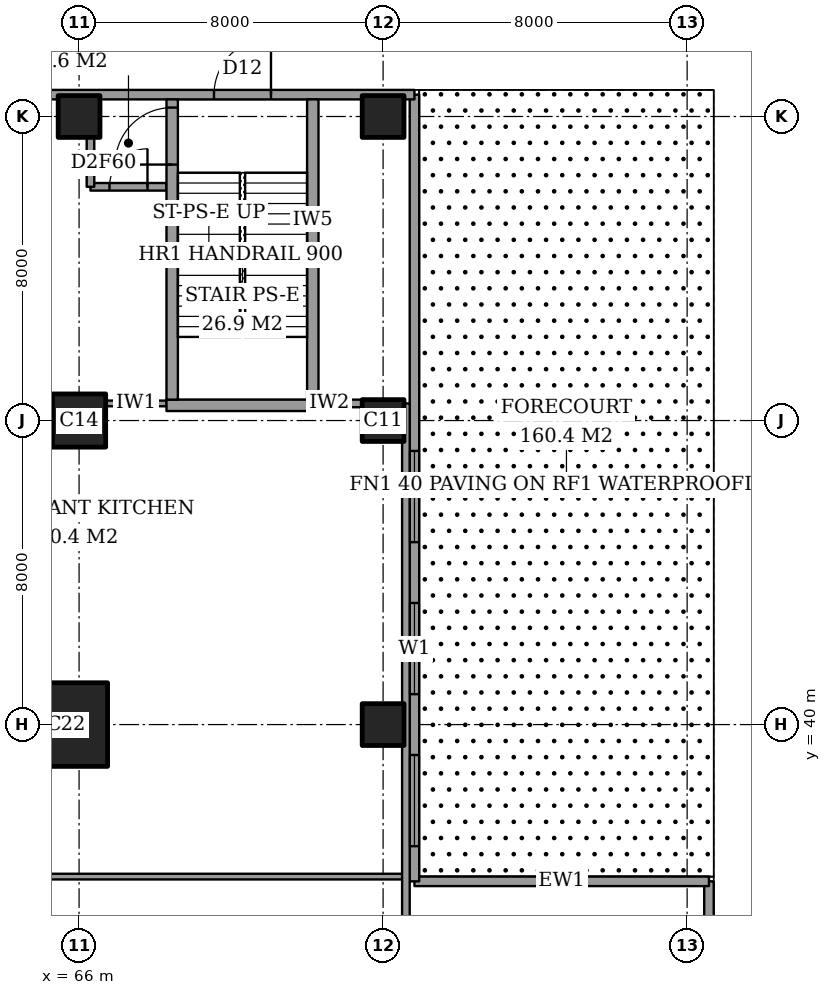
"""IFC4 building model, lengths in metres.
Left out: names, types, materials, properties, quantities, classifications, styles, units other than length and angle.
Written with IfcOpenShell. Run it as: python <this file> out.ifc"""

import sys

from ifc_helpers import new_model, si_unit, direction, frame, frame_2d, origin, origin_2d, place, context, subcontext, project, spatial, rectangle, extrude, element, fill, save


model = new_model("IFC4")
c1 = context("Model", 3, precision=1e-05, world=origin(), true_north=direction((0.0, 1.0)))
c2 = subcontext(c1, "Body", "Model", "MODEL_VIEW")
j1 = project(units=[si_unit("LENGTHUNIT", "METRE"), si_unit("PLANEANGLEUNIT", "RADIAN")], contexts=[c1])
p1 = place(None, origin())
s1 = spatial("IfcSite", under=j1, at=p1, CompositionType="ELEMENT")
p2 = place(p1, origin())
s2 = spatial("IfcBuilding", under=s1, at=p2, CompositionType="ELEMENT")
p3 = place(p2, origin())
s3 = spatial("IfcBuildingStorey", under=s2, at=p3, CompositionType="ELEMENT", Elevation=0.0)
p4 = place(p3, frame((65.65, 40.0, 0.0), z_axis=(0.0, 0.0, 1.0), x_axis=(1.0, 0.0, 0.0)))
e1 = element("IfcColumn", 1, at=p4, inside=s3, PredefinedType="COLUMN", context=c2, shape_type="SweptSolid", body=[
    extrude(rectangle(XDim=2.2, YDim=2.2, at=origin_2d()), origin(), (0.0, 0.0, 1.0), 6.0),
])
p5 = place(p3, frame((66.0, 48.0, 0.0), z_axis=(0.0, 0.0, 1.0), x_axis=(1.0, 0.0, 0.0)))
e2 = element("IfcColumn", 2, at=p5, inside=s3, PredefinedType="COLUMN", context=c2, shape_type="SweptSolid", body=[
    extrude(rectangle(XDim=1.4, YDim=1.4, at=origin_2d()), origin(), (0.0, 0.0, 1.0), 6.0),
])
for number, where, z_axis, x_axis in (
    (3, (66.0, 56.0, 0.0), (0.0, 0.0, 1.0), (1.0, 0.0, 0.0)),
    (4, (74.0, 40.0, 0.0), (0.0, 0.0, 1.0), (1.0, 0.0, 0.0)),
    (5, (74.0, 48.0, 0.0), (0.0, 0.0, 1.0), (1.0, 0.0, 0.0)),
    (6, (74.0, 56.0, 0.0), (0.0, 0.0, 1.0), (1.0, 0.0, 0.0)),
):
    element("IfcColumn", number, at=place(p3, frame(where, z_axis=z_axis, x_axis=x_axis)), inside=s3, PredefinedType="COLUMN", context=c2, shape_type="SweptSolid", body=[
        extrude(rectangle(XDim=1.1, YDim=1.1, at=origin_2d()), origin(), (0.0, 0.0, 1.0), 6.0),
    ])
p6 = place(p3, frame((82.575, -16.575, 0.0), z_axis=(0.0, 0.0, 1.0), x_axis=(0.0, 1.0, 0.0)))
e7 = element("IfcWall", 7, at=p6, inside=s3, PredefinedType="SOLIDWALL", context=c2, shape_type="SweptSolid", body=[
    extrude(rectangle(XDim=52.45, YDim=0.25, at=frame_2d((26.225, 0.0))), origin(), (0.0, 0.0, 1.0), 6.0),
])
p7 = place(p6, frame((1.65, 0.0, 0.3)))
e8 = element("IfcOpeningElement", 8, at=p7, cuts=e7, PredefinedType="OPENING", context=c2, shape_type="SweptSolid", body=[
    extrude(rectangle(XDim=2.4, YDim=3.6, at=frame_2d((1.2, 1.8))), frame((0.0, 0.135, 0.0), z_axis=(0.0, -1.0, 0.0), x_axis=(1.0, 0.0, 0.0)), (0.0, 0.0, 1.0), 0.27),
])
p8 = place(p6, frame((5.1, 0.0, 0.3)))
e9 = element("IfcOpeningElement", 9, at=p8, cuts=e7, PredefinedType="OPENING", context=c2, shape_type="SweptSolid", body=[
    extrude(rectangle(XDim=2.4, YDim=3.6, at=frame_2d((1.2, 1.8))), frame((0.0, 0.135, 0.0), z_axis=(0.0, -1.0, 0.0), x_axis=(1.0, 0.0, 0.0)), (0.0, 0.0, 1.0), 0.27),
])
p9 = place(p6, frame((9.65, 0.0, 0.3)))
e10 = element("IfcOpeningElement", 10, at=p9, cuts=e7, PredefinedType="OPENING", context=c2, shape_type="SweptSolid", body=[
    extrude(rectangle(XDim=2.4, YDim=3.6, at=frame_2d((1.2, 1.8))), frame((0.0, 0.135, 0.0), z_axis=(0.0, -1.0, 0.0), x_axis=(1.0, 0.0, 0.0)), (0.0, 0.0, 1.0), 0.27),
])
p10 = place(p3, frame((82.575, 35.875, 0.0), z_axis=(0.0, 0.0, 1.0), x_axis=(-1.0, 0.0, 0.0)))
e11 = element("IfcWall", 11, at=p10, inside=s3, PredefinedType="SOLIDWALL", context=c2, shape_type="SweptSolid", body=[
    extrude(rectangle(XDim=7.75, YDim=0.25, at=frame_2d((3.875, 0.0))), origin(), (0.0, 0.0, 1.0), 6.0),
])
p11 = place(p3, frame((74.825, 35.875, 0.0), z_axis=(0.0, 0.0, 1.0), x_axis=(0.0, 1.0, 0.0)))
e12 = element("IfcWall", 12, at=p11, inside=s3, PredefinedType="SOLIDWALL", context=c2, shape_type="SweptSolid", body=[
    extrude(rectangle(XDim=20.7, YDim=0.25, at=frame_2d((10.35, 0.0))), origin(), (0.0, 0.0, 1.0), 6.0),
])
p12 = place(p11, frame((4.925, 0.0, 0.3)))
e13 = element("IfcOpeningElement", 13, at=p12, cuts=e12, PredefinedType="OPENING", context=c2, shape_type="SweptSolid", body=[
    extrude(rectangle(XDim=2.4, YDim=3.6, at=frame_2d((1.2, 1.8))), frame((0.0, 0.135, 0.0), z_axis=(0.0, -1.0, 0.0), x_axis=(1.0, 0.0, 0.0)), (0.0, 0.0, 1.0), 0.27),
])
p13 = place(p11, frame((8.925, 0.0, 0.3)))
e14 = element("IfcOpeningElement", 14, at=p13, cuts=e12, PredefinedType="OPENING", context=c2, shape_type="SweptSolid", body=[
    extrude(rectangle(XDim=2.4, YDim=3.6, at=frame_2d((1.2, 1.8))), frame((0.0, 0.135, 0.0), z_axis=(0.0, -1.0, 0.0), x_axis=(1.0, 0.0, 0.0)), (0.0, 0.0, 1.0), 0.27),
])
p14 = place(p11, frame((0.925, 0.0, 0.3)))
e15 = element("IfcOpeningElement", 15, at=p14, cuts=e12, PredefinedType="OPENING", context=c2, shape_type="SweptSolid", body=[
    extrude(rectangle(XDim=2.4, YDim=3.6, at=frame_2d((1.2, 1.8))), frame((0.0, 0.135, 0.0), z_axis=(0.0, -1.0, 0.0), x_axis=(1.0, 0.0, 0.0)), (0.0, 0.0, 1.0), 0.27),
])
p15 = place(p3, frame((74.825, 56.575, 0.0), z_axis=(0.0, 0.0, 1.0), x_axis=(-1.0, 0.0, 0.0)))
e16 = element("IfcWall", 16, at=p15, inside=s3, PredefinedType="SOLIDWALL", context=c2, shape_type="SweptSolid", body=[
    extrude(rectangle(XDim=91.4, YDim=0.25, at=frame_2d((45.7, 0.0))), origin(), (0.0, 0.0, 1.0), 6.0),
])
p16 = place(p15, frame((27.025, 0.0, 0.0)))
e17 = element("IfcOpeningElement", 17, at=p16, cuts=e16, PredefinedType="OPENING", context=c2, shape_type="SweptSolid", body=[
    extrude(rectangle(XDim=3.6, YDim=3.6, at=frame_2d((1.8, 1.8))), frame((0.0, 0.135, 0.0), z_axis=(0.0, -1.0, 0.0), x_axis=(1.0, 0.0, 0.0)), (0.0, 0.0, 1.0), 0.27),
])
p17 = place(p15, frame((9.863, 0.0, 0.3)))
e18 = element("IfcOpeningElement", 18, at=p17, cuts=e16, PredefinedType="OPENING", context=c2, shape_type="SweptSolid", body=[
    extrude(rectangle(XDim=2.4, YDim=3.6, at=frame_2d((1.2, 1.8))), frame((0.0, 0.135, 0.0), z_axis=(0.0, -1.0, 0.0), x_axis=(1.0, 0.0, 0.0)), (0.0, 0.0, 1.0), 0.27),
])
p18 = place(p15, frame((13.238, 0.0, 0.3)))
e19 = element("IfcOpeningElement", 19, at=p18, cuts=e16, PredefinedType="OPENING", context=c2, shape_type="SweptSolid", body=[
    extrude(rectangle(XDim=2.4, YDim=3.6, at=frame_2d((1.2, 1.8))), frame((0.0, 0.135, 0.0), z_axis=(0.0, -1.0, 0.0), x_axis=(1.0, 0.0, 0.0)), (0.0, 0.0, 1.0), 0.27),
])
p19 = place(p15, frame((17.975, 0.0, 0.3)))
e20 = element("IfcOpeningElement", 20, at=p19, cuts=e16, PredefinedType="OPENING", context=c2, shape_type="SweptSolid", body=[
    extrude(rectangle(XDim=2.4, YDim=3.6, at=frame_2d((1.2, 1.8))), frame((0.0, 0.135, 0.0), z_axis=(0.0, -1.0, 0.0), x_axis=(1.0, 0.0, 0.0)), (0.0, 0.0, 1.0), 0.27),
])
p20 = place(p15, frame((21.275, 0.0, 0.3)))
e21 = element("IfcOpeningElement", 21, at=p20, cuts=e16, PredefinedType="OPENING", context=c2, shape_type="SweptSolid", body=[
    extrude(rectangle(XDim=2.4, YDim=3.6, at=frame_2d((1.2, 1.8))), frame((0.0, 0.135, 0.0), z_axis=(0.0, -1.0, 0.0), x_axis=(1.0, 0.0, 0.0)), (0.0, 0.0, 1.0), 0.27),
])
p21 = place(p15, frame((34.15, 0.0, 0.3)))
e22 = element("IfcOpeningElement", 22, at=p21, cuts=e16, PredefinedType="OPENING", context=c2, shape_type="SweptSolid", body=[
    extrude(rectangle(XDim=2.4, YDim=3.6, at=frame_2d((1.2, 1.8))), frame((0.0, 0.135, 0.0), z_axis=(0.0, -1.0, 0.0), x_axis=(1.0, 0.0, 0.0)), (0.0, 0.0, 1.0), 0.27),
])
p22 = place(p15, frame((38.1, 0.0, 0.3)))
e23 = element("IfcOpeningElement", 23, at=p22, cuts=e16, PredefinedType="OPENING", context=c2, shape_type="SweptSolid", body=[
    extrude(rectangle(XDim=2.4, YDim=3.6, at=frame_2d((1.2, 1.8))), frame((0.0, 0.135, 0.0), z_axis=(0.0, -1.0, 0.0), x_axis=(1.0, 0.0, 0.0)), (0.0, 0.0, 1.0), 0.27),
])
p23 = place(p15, frame((43.15, 0.0, 0.3)))
e24 = element("IfcOpeningElement", 24, at=p23, cuts=e16, PredefinedType="OPENING", context=c2, shape_type="SweptSolid", body=[
    extrude(rectangle(XDim=2.4, YDim=3.6, at=frame_2d((1.2, 1.8))), frame((0.0, 0.135, 0.0), z_axis=(0.0, -1.0, 0.0), x_axis=(1.0, 0.0, 0.0)), (0.0, 0.0, 1.0), 0.27),
])
p24 = place(p15, frame((47.1, 0.0, 0.3)))
e25 = element("IfcOpeningElement", 25, at=p24, cuts=e16, PredefinedType="OPENING", context=c2, shape_type="SweptSolid", body=[
    extrude(rectangle(XDim=2.4, YDim=3.6, at=frame_2d((1.2, 1.8))), frame((0.0, 0.135, 0.0), z_axis=(0.0, -1.0, 0.0), x_axis=(1.0, 0.0, 0.0)), (0.0, 0.0, 1.0), 0.27),
])
p25 = place(p15, frame((53.775, 0.0, 0.0)))
e26 = element("IfcOpeningElement", 26, at=p25, cuts=e16, PredefinedType="OPENING", context=c2, shape_type="SweptSolid", body=[
    extrude(rectangle(XDim=2.1, YDim=2.4, at=frame_2d((1.05, 1.2))), frame((0.0, 0.135, 0.0), z_axis=(0.0, -1.0, 0.0), x_axis=(1.0, 0.0, 0.0)), (0.0, 0.0, 1.0), 0.27),
])
p26 = place(p15, frame((61.775, 0.0, 0.0)))
e27 = element("IfcOpeningElement", 27, at=p26, cuts=e16, PredefinedType="OPENING", context=c2, shape_type="SweptSolid", body=[
    extrude(rectangle(XDim=2.1, YDim=2.4, at=frame_2d((1.05, 1.2))), frame((0.0, 0.135, 0.0), z_axis=(0.0, -1.0, 0.0), x_axis=(1.0, 0.0, 0.0)), (0.0, 0.0, 1.0), 0.27),
])
p27 = place(p15, frame((69.775, 0.0, 0.0)))
e28 = element("IfcOpeningElement", 28, at=p27, cuts=e16, PredefinedType="OPENING", context=c2, shape_type="SweptSolid", body=[
    extrude(rectangle(XDim=2.1, YDim=2.4, at=frame_2d((1.05, 1.2))), frame((0.0, 0.135, 0.0), z_axis=(0.0, -1.0, 0.0), x_axis=(1.0, 0.0, 0.0)), (0.0, 0.0, 1.0), 0.27),
])
p28 = place(p15, frame((83.9, 0.0, 0.3)))
e29 = element("IfcOpeningElement", 29, at=p28, cuts=e16, PredefinedType="OPENING", context=c2, shape_type="SweptSolid", body=[
    extrude(rectangle(XDim=2.4, YDim=3.6, at=frame_2d((1.2, 1.8))), frame((0.0, 0.135, 0.0), z_axis=(0.0, -1.0, 0.0), x_axis=(1.0, 0.0, 0.0)), (0.0, 0.0, 1.0), 0.27),
])
p29 = place(p15, frame((87.35, 0.0, 0.3)))
e30 = element("IfcOpeningElement", 30, at=p29, cuts=e16, PredefinedType="OPENING", context=c2, shape_type="SweptSolid", body=[
    extrude(rectangle(XDim=2.4, YDim=3.6, at=frame_2d((1.2, 1.8))), frame((0.0, 0.135, 0.0), z_axis=(0.0, -1.0, 0.0), x_axis=(1.0, 0.0, 0.0)), (0.0, 0.0, 1.0), 0.27),
])
p30 = place(p15, frame((5.275, 0.0, 0.0), z_axis=(0.0, 0.0, 1.0), x_axis=(-1.0, 0.0, 0.0)))
e31 = element("IfcOpeningElement", 31, at=p30, cuts=e16, PredefinedType="OPENING", context=c2, shape_type="SweptSolid", body=[
    extrude(rectangle(XDim=1.5, YDim=2.1, at=frame_2d((0.75, 1.05))), frame((0.0, 0.135, 0.0), z_axis=(0.0, -1.0, 0.0), x_axis=(1.0, 0.0, 0.0)), (0.0, 0.0, 1.0), 0.27),
])
p31 = place(p15, frame((79.875, 0.0, 0.0), z_axis=(0.0, 0.0, 1.0), x_axis=(-1.0, 0.0, 0.0)))
e32 = element("IfcOpeningElement", 32, at=p31, cuts=e16, PredefinedType="OPENING", context=c2, shape_type="SweptSolid", body=[
    extrude(rectangle(XDim=1.5, YDim=2.1, at=frame_2d((0.75, 1.05))), frame((0.0, 0.135, 0.0), z_axis=(0.0, -1.0, 0.0), x_axis=(1.0, 0.0, 0.0)), (0.0, 0.0, 1.0), 0.27),
])
p32 = place(p3, frame((47.1, 36.0, 0.0), z_axis=(0.0, 0.0, 1.0), x_axis=(1.0, 0.0, 0.0)))
e33 = element("IfcWall", 33, at=p32, inside=s3, PredefinedType="PARTITIONING", context=c2, shape_type="SweptSolid", body=[
    extrude(rectangle(XDim=27.5, YDim=0.15, at=frame_2d((13.75, 0.0))), origin(), (0.0, 0.0, 1.0), 5.7),
])
p33 = place(p32, frame((13.75, 0.0, 0.0)))
e34 = element("IfcOpeningElement", 34, at=p33, cuts=e33, PredefinedType="OPENING", context=c2, shape_type="SweptSolid", body=[
    extrude(rectangle(XDim=0.9, YDim=2.1, at=frame_2d((0.45, 1.05))), frame((0.0, 0.085, 0.0), z_axis=(0.0, -1.0, 0.0), x_axis=(1.0, 0.0, 0.0)), (0.0, 0.0, 1.0), 0.17),
])
p34 = place(p3, frame((72.3, 48.45, 0.0), z_axis=(0.0, 0.0, 1.0), x_axis=(1.0, 0.0, 0.0)))
e35 = element("IfcWall", 35, at=p34, inside=s3, PredefinedType="PARTITIONING", context=c2, shape_type="SweptSolid", body=[
    extrude(rectangle(XDim=1.15, YDim=0.2, at=frame_2d((0.575, 0.0))), origin(), (0.0, 0.0, 1.0), 5.7),
])
p35 = place(p3, frame((59.1, 48.45, 0.0), z_axis=(0.0, 0.0, 1.0), x_axis=(1.0, 0.0, 0.0)))
e36 = element("IfcWall", 36, at=p35, inside=s3, PredefinedType="PARTITIONING", context=c2, shape_type="SweptSolid", body=[
    extrude(rectangle(XDim=6.2, YDim=0.15, at=frame_2d((3.1, 0.0))), origin(), (0.0, 0.0, 1.0), 5.7),
])
p36 = place(p3, frame((66.7, 48.45, 0.0), z_axis=(0.0, 0.0, 1.0), x_axis=(1.0, 0.0, 0.0)))
e37 = element("IfcWall", 37, at=p36, inside=s3, PredefinedType="PARTITIONING", context=c2, shape_type="SweptSolid", body=[
    extrude(rectangle(XDim=1.6, YDim=0.15, at=frame_2d((0.8, 0.0))), origin(), (0.0, 0.0, 1.0), 5.7),
])
p37 = place(p3, frame((66.3, 54.15, 0.0), z_axis=(0.0, 0.0, 1.0), x_axis=(1.0, 0.0, 0.0)))
e38 = element("IfcWall", 38, at=p37, inside=s3, PredefinedType="PARTITIONING", context=c2, shape_type="SweptSolid", body=[
    extrude(rectangle(XDim=2.0, YDim=0.2, at=frame_2d((1.0, 0.0))), origin(), (0.0, 0.0, 1.0), 5.7),
])
p38 = place(p37, frame((0.5, 0.0, 0.0)))
e39 = element("IfcOpeningElement", 39, at=p38, cuts=e38, PredefinedType="OPENING", context=c2, shape_type="SweptSolid", body=[
    extrude(rectangle(XDim=1.0, YDim=2.1, at=frame_2d((0.5, 1.05))), frame((0.0, 0.11, 0.0), z_axis=(0.0, -1.0, 0.0), x_axis=(1.0, 0.0, 0.0)), (0.0, 0.0, 1.0), 0.22),
])
p39 = place(p3, frame((66.3, 54.15, 0.0), z_axis=(0.0, 0.0, 1.0), x_axis=(0.0, 1.0, 0.0)))
e40 = element("IfcWall", 40, at=p39, inside=s3, PredefinedType="PARTITIONING", context=c2, shape_type="SweptSolid", body=[
    extrude(rectangle(XDim=1.3, YDim=0.2, at=frame_2d((0.65, 0.0))), origin(), (0.0, 0.0, 1.0), 4.3),
])
p40 = place(p3, frame((74.6, 0.0, 0.0), z_axis=(0.0, 0.0, 1.0), x_axis=(0.0, 1.0, 0.0)))
e41 = element("IfcWall", 41, at=p40, inside=s3, PredefinedType="PARTITIONING", context=c2, shape_type="SweptSolid", body=[
    extrude(rectangle(XDim=48.45, YDim=0.2, at=frame_2d((24.225, 0.0))), origin(), (0.0, 0.0, 1.0), 5.7),
])
p41 = place(p3, frame((68.3, 48.4, 0.0), z_axis=(0.0, 0.0, 1.0), x_axis=(1.0, 0.0, 0.0)))
e42 = element("IfcWall", 42, at=p41, inside=s3, PredefinedType="PARTITIONING", context=c2, shape_type="SweptSolid", body=[
    extrude(rectangle(XDim=4.0, YDim=0.3, at=frame_2d((2.0, 0.0))), origin(), (0.0, 0.0, 1.0), 6.0),
])
p42 = place(p3, frame((68.45, 48.55, 0.0), z_axis=(0.0, 0.0, 1.0), x_axis=(0.0, 1.0, 0.0)))
e43 = element("IfcWall", 43, at=p42, inside=s3, PredefinedType="PARTITIONING", context=c2, shape_type="SweptSolid", body=[
    extrude(rectangle(XDim=7.9, YDim=0.3, at=frame_2d((3.95, 0.0))), origin(), (0.0, 0.0, 1.0), 6.0),
])
p43 = place(p42, frame((6.185, 0.0, 0.0)))
e44 = element("IfcOpeningElement", 44, at=p43, cuts=e43, PredefinedType="OPENING", context=c2, shape_type="SweptSolid", body=[
    extrude(rectangle(XDim=1.5, YDim=2.1, at=frame_2d((0.75, 1.05))), frame((0.0, 0.16, 0.0), z_axis=(0.0, -1.0, 0.0), x_axis=(1.0, 0.0, 0.0)), (0.0, 0.0, 1.0), 0.32),
])
p44 = place(p3, frame((72.15, 48.55, 0.0), z_axis=(0.0, 0.0, 1.0), x_axis=(0.0, 1.0, 0.0)))
e45 = element("IfcWall", 45, at=p44, inside=s3, PredefinedType="PARTITIONING", context=c2, shape_type="SweptSolid", body=[
    extrude(rectangle(XDim=7.9, YDim=0.3, at=frame_2d((3.95, 0.0))), origin(), (0.0, 0.0, 1.0), 6.0),
])
p45 = place(p12, origin())
e46 = element("IfcWindow", 46, at=p45, inside=s3, PartitioningType="SINGLE_PANEL", PredefinedType="WINDOW", context=c2, shape_type="SweptSolid", body=[
    extrude(rectangle(XDim=2.4, YDim=3.6, at=frame_2d((1.2, 1.8))), frame((0.0, 0.03, 0.0), z_axis=(0.0, -1.0, 0.0), x_axis=(1.0, 0.0, 0.0)), (0.0, 0.0, 1.0), 0.06),
])
fill(e13, e46)
p46 = place(p13, origin())
e47 = element("IfcWindow", 47, at=p46, inside=s3, PartitioningType="SINGLE_PANEL", PredefinedType="WINDOW", context=c2, shape_type="SweptSolid", body=[
    extrude(rectangle(XDim=2.4, YDim=3.6, at=frame_2d((1.2, 1.8))), frame((0.0, 0.03, 0.0), z_axis=(0.0, -1.0, 0.0), x_axis=(1.0, 0.0, 0.0)), (0.0, 0.0, 1.0), 0.06),
])
fill(e14, e47)
p47 = place(p14, origin())
e48 = element("IfcWindow", 48, at=p47, inside=s3, PartitioningType="SINGLE_PANEL", PredefinedType="WINDOW", context=c2, shape_type="SweptSolid", body=[
    extrude(rectangle(XDim=2.4, YDim=3.6, at=frame_2d((1.2, 1.8))), frame((0.0, 0.03, 0.0), z_axis=(0.0, -1.0, 0.0), x_axis=(1.0, 0.0, 0.0)), (0.0, 0.0, 1.0), 0.06),
])
fill(e15, e48)
p48 = place(p38, origin())
e49 = element("IfcDoor", 49, at=p48, inside=s3, OperationType="SINGLE_SWING_LEFT", PredefinedType="DOOR", context=c2, shape_type="SweptSolid", body=[
    extrude(rectangle(XDim=1.0, YDim=2.1, at=frame_2d((0.5, 1.05))), frame((0.0, 0.025, 0.0), z_axis=(0.0, -1.0, 0.0), x_axis=(1.0, 0.0, 0.0)), (0.0, 0.0, 1.0), 0.05),
])
fill(e39, e49)
p49 = place(p43, origin())
e50 = element("IfcDoor", 50, at=p49, inside=s3, OperationType="DOUBLE_DOOR_SINGLE_SWING", PredefinedType="DOOR", context=c2, shape_type="SweptSolid", body=[
    extrude(rectangle(XDim=1.5, YDim=2.1, at=frame_2d((0.75, 1.05))), frame((0.0, 0.025, 0.0), z_axis=(0.0, -1.0, 0.0), x_axis=(1.0, 0.0, 0.0)), (0.0, 0.0, 1.0), 0.05),
])
fill(e44, e50)
p50 = place(p30, origin())
e51 = element("IfcDoor", 51, at=p50, inside=s3, OperationType="DOUBLE_DOOR_SINGLE_SWING", PredefinedType="DOOR", context=c2, shape_type="SweptSolid", body=[
    extrude(rectangle(XDim=1.5, YDim=2.1, at=frame_2d((0.75, 1.05))), frame((0.0, 0.025, 0.0), z_axis=(0.0, -1.0, 0.0), x_axis=(1.0, 0.0, 0.0)), (0.0, 0.0, 1.0), 0.05),
])
fill(e31, e51)
save(model, sys.argv[1])
